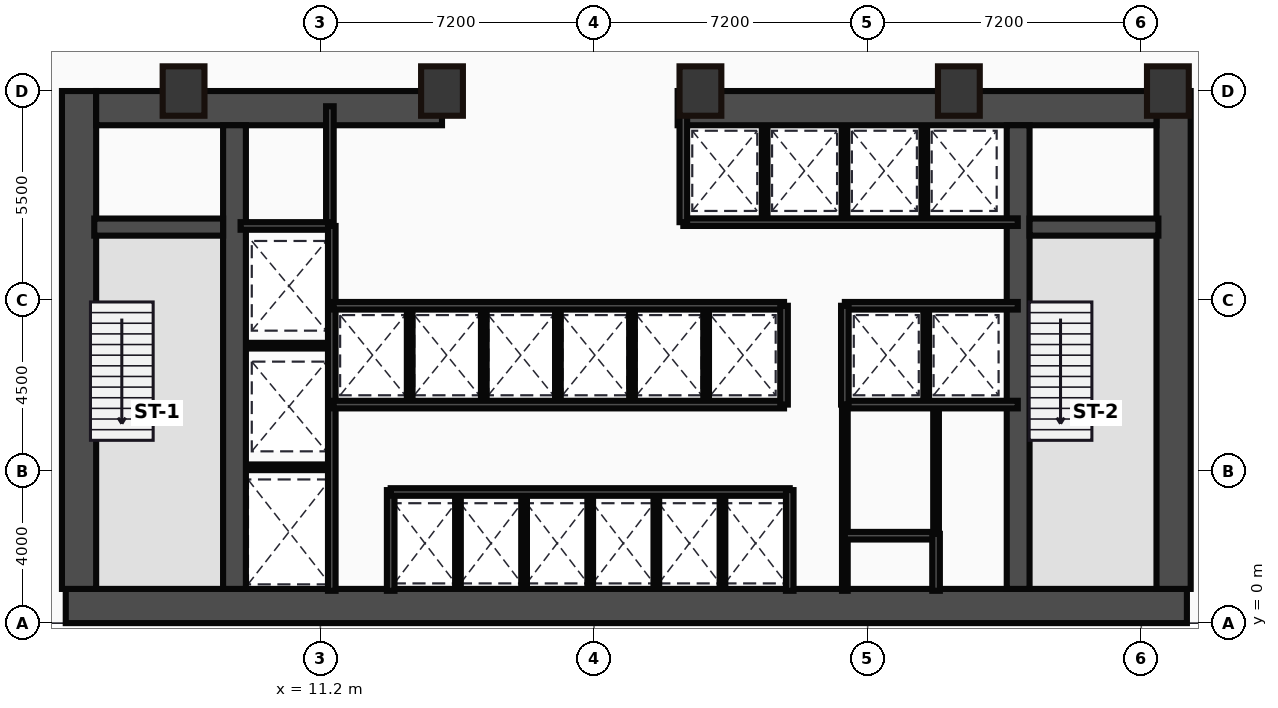
"""IFC4 building model, lengths in metres.
Left out: names, types, materials, properties, quantities, classifications, styles, units other than length and angle.
Written with IfcOpenShell. Run it as: python <this file> out.ifc"""

import sys

from ifc_helpers import new_model, si_unit, direction, frame, frame_2d, origin, origin_2d, place, context, subcontext, project, spatial, rectangle, hollow_rectangle, extrude, source, transform, mapped, element, fill, save


model = new_model("IFC4")
c1 = context("Model", 3, precision=1e-05, world=origin(), true_north=direction((0.0, 1.0)))
c2 = subcontext(c1, "Body", "Model", "MODEL_VIEW")
j1 = project(units=[si_unit("LENGTHUNIT", "METRE"), si_unit("PLANEANGLEUNIT", "RADIAN")], contexts=[c1])
p1 = place(None, origin())
s1 = spatial("IfcSite", under=j1, at=p1, CompositionType="ELEMENT")
p2 = place(p1, origin())
s2 = spatial("IfcBuilding", under=s1, at=p2, CompositionType="ELEMENT")
p3 = place(p2, frame((0.0, 0.0, 6.0)))
s3 = spatial("IfcBuildingStorey", under=s2, at=p3, CompositionType="ELEMENT", Elevation=6.0)
m1 = source(origin(), c2, "Body", "SweptSolid", [
    extrude(rectangle(XDim=29.5, YDim=0.9, at=frame_2d((14.75, 0.0))), origin(), (0.0, 0.0, 1.0), 5.0),
])
p4 = place(p3, frame((4.5, 0.45, 0.0), z_axis=(0.0, 0.0, 1.0), x_axis=(1.0, 0.0, 0.0)))
e1 = element("IfcWall", 1, at=p4, inside=s3, PredefinedType="SHEAR", context=c2, shape_type="MappedRepresentation", body=[
    mapped(m1, transform((0.0, 0.0, 0.0))),
])
m2 = source(origin(), c2, "Body", "SweptSolid", [
    extrude(rectangle(XDim=13.1, YDim=0.9, at=frame_2d((6.55, 0.0))), origin(), (0.0, 0.0, 1.0), 5.0),
])
for number, where, z_axis, x_axis in (
    (2, (4.85, 0.9, 0.0), (0.0, 0.0, 1.0), (0.0, 1.0, 0.0)),
    (3, (33.65, 0.9, 0.0), (0.0, 0.0, 1.0), (0.0, 1.0, 0.0)),
):
    element("IfcWall", number, at=place(p3, frame(where, z_axis=z_axis, x_axis=x_axis)), inside=s3, PredefinedType="SHEAR", context=c2, shape_type="MappedRepresentation", body=[
        mapped(m2, transform((0.0, 0.0, 0.0))),
    ])
m3 = source(origin(), c2, "Body", "SweptSolid", [
    extrude(rectangle(XDim=9.1, YDim=0.9, at=frame_2d((4.55, 0.0))), origin(), (0.0, 0.0, 1.0), 5.0),
])
p5 = place(p3, frame((5.3, 13.55, 0.0), z_axis=(0.0, 0.0, 1.0), x_axis=(1.0, 0.0, 0.0)))
e4 = element("IfcWall", 4, at=p5, inside=s3, PredefinedType="SHEAR", context=c2, shape_type="MappedRepresentation", body=[
    mapped(m3, transform((0.0, 0.0, 0.0))),
])
p6 = place(p5, frame((4.1, 0.0, 0.0)))
e5 = element("IfcOpeningElement", 5, at=p6, cuts=e4, PredefinedType="OPENING", context=c2, shape_type="SweptSolid", body=[
    extrude(rectangle(XDim=1.1, YDim=2.15, at=frame_2d((0.55, 1.075))), frame((0.0, 0.46, 0.0), z_axis=(0.0, -1.0, 0.0), x_axis=(1.0, 0.0, 0.0)), (0.0, 0.0, 1.0), 0.92),
])
m4 = source(origin(), c2, "Body", "SweptSolid", [
    extrude(rectangle(XDim=12.6, YDim=0.9, at=frame_2d((6.3, 0.0))), origin(), (0.0, 0.0, 1.0), 5.0),
])
p7 = place(p3, frame((20.6, 13.55, 0.0), z_axis=(0.0, 0.0, 1.0), x_axis=(1.0, 0.0, 0.0)))
e6 = element("IfcWall", 6, at=p7, inside=s3, PredefinedType="SHEAR", context=c2, shape_type="MappedRepresentation", body=[
    mapped(m4, transform((0.0, 0.0, 0.0))),
])
p8 = place(p7, frame((9.25, 0.0, 0.0)))
e7 = element("IfcOpeningElement", 7, at=p8, cuts=e6, PredefinedType="OPENING", context=c2, shape_type="SweptSolid", body=[
    extrude(rectangle(XDim=1.1, YDim=2.15, at=frame_2d((0.55, 1.075))), frame((0.0, 0.46, 0.0), z_axis=(0.0, -1.0, 0.0), x_axis=(1.0, 0.0, 0.0)), (0.0, 0.0, 1.0), 0.92),
])
m5 = source(origin(), c2, "Body", "SweptSolid", [
    extrude(rectangle(XDim=12.2, YDim=0.6, at=frame_2d((6.1, 0.0))), origin(), (0.0, 0.0, 1.0), 5.0),
])
for number, where, z_axis, x_axis in (
    (8, (8.94, 0.9, 0.0), (0.0, 0.0, 1.0), (0.0, 1.0, 0.0)),
    (9, (29.56, 0.9, 0.0), (0.0, 0.0, 1.0), (0.0, 1.0, 0.0)),
):
    element("IfcWall", number, at=place(p3, frame(where, z_axis=z_axis, x_axis=x_axis)), inside=s3, PredefinedType="SHEAR", context=c2, shape_type="MappedRepresentation", body=[
        mapped(m5, transform((0.0, 0.0, 0.0))),
    ])
m6 = source(origin(), c2, "Body", "SweptSolid", [
    extrude(rectangle(XDim=3.39, YDim=0.45, at=frame_2d((1.695, 0.0))), origin(), (0.0, 0.0, 1.0), 5.0),
])
p9 = place(p3, frame((5.25, 10.42, 0.0), z_axis=(0.0, 0.0, 1.0), x_axis=(1.0, 0.0, 0.0)))
e10 = element("IfcWall", 10, at=p9, inside=s3, PredefinedType="SHEAR", context=c2, shape_type="MappedRepresentation", body=[
    mapped(m6, transform((0.0, 0.0, 0.0))),
])
p10 = place(p9, frame((1.05, 0.0, 0.0)))
e11 = element("IfcOpeningElement", 11, at=p10, cuts=e10, PredefinedType="OPENING", context=c2, shape_type="SweptSolid", body=[
    extrude(rectangle(XDim=1.1, YDim=2.15, at=frame_2d((0.55, 1.075))), frame((0.0, 0.235, 0.0), z_axis=(0.0, -1.0, 0.0), x_axis=(1.0, 0.0, 0.0)), (0.0, 0.0, 1.0), 0.47),
])
p11 = place(p3, frame((29.86, 10.42, 0.0), z_axis=(0.0, 0.0, 1.0), x_axis=(1.0, 0.0, 0.0)))
e12 = element("IfcWall", 12, at=p11, inside=s3, PredefinedType="SHEAR", context=c2, shape_type="MappedRepresentation", body=[
    mapped(m6, transform((0.0, 0.0, 0.0))),
])
p12 = place(p11, frame((1.1, 0.0, 0.0)))
e13 = element("IfcOpeningElement", 13, at=p12, cuts=e12, PredefinedType="OPENING", context=c2, shape_type="SweptSolid", body=[
    extrude(rectangle(XDim=1.1, YDim=2.15, at=frame_2d((0.55, 1.075))), frame((0.0, 0.235, 0.0), z_axis=(0.0, -1.0, 0.0), x_axis=(1.0, 0.0, 0.0)), (0.0, 0.0, 1.0), 0.47),
])
m7 = source(origin(), c2, "Body", "SweptSolid", [
    extrude(hollow_rectangle(XDim=1.1, YDim=1.3, WallThickness=0.055, at=origin_2d()), origin(), (0.0, 0.0, 1.0), 5.0),
])
for number, where, z_axis, x_axis in (
    (14, (7.6, 14.0, 0.0), (0.0, 0.0, 1.0), (1.0, 0.0, 0.0)),
    (15, (14.4, 14.0, 0.0), (0.0, 0.0, 1.0), (1.0, 0.0, 0.0)),
    (16, (21.2, 14.0, 0.0), (0.0, 0.0, 1.0), (1.0, 0.0, 0.0)),
    (17, (28.0, 14.0, 0.0), (0.0, 0.0, 1.0), (1.0, 0.0, 0.0)),
    (18, (33.5, 14.0, 0.0), (0.0, 0.0, 1.0), (1.0, 0.0, 0.0)),
):
    element("IfcColumn", number, at=place(p3, frame(where, z_axis=z_axis, x_axis=x_axis)), inside=s3, PredefinedType="PILASTER", context=c2, shape_type="MappedRepresentation", body=[
        mapped(m7, transform((0.0, 0.0, 0.0))),
    ])
m8 = source(origin(), c2, "Body", "SweptSolid", [
    extrude(rectangle(XDim=3.18, YDim=0.2, at=frame_2d((1.59, 0.0))), origin(), (0.0, 0.0, 1.0), 4.7),
])
p13 = place(p3, frame((11.45, 10.42, 0.0), z_axis=(0.0, 0.0, 1.0), x_axis=(0.0, 1.0, 0.0)))
e19 = element("IfcWall", 19, at=p13, inside=s3, PredefinedType="PARTITIONING", context=c2, shape_type="MappedRepresentation", body=[
    mapped(m8, transform((0.0, 0.0, 0.0))),
])
m9 = source(origin(), c2, "Body", "SweptSolid", [
    extrude(rectangle(XDim=2.35, YDim=0.2, at=frame_2d((1.175, 0.0))), origin(), (0.0, 0.0, 1.0), 4.7),
])
p14 = place(p3, frame((9.1, 10.45, 0.0), z_axis=(0.0, 0.0, 1.0), x_axis=(1.0, 0.0, 0.0)))
e20 = element("IfcWall", 20, at=p14, inside=s3, PredefinedType="PARTITIONING", context=c2, shape_type="MappedRepresentation", body=[
    mapped(m9, transform((0.0, 0.0, 0.0))),
])
p15 = place(p14, frame((0.55, 0.0, 0.0)))
e21 = element("IfcOpeningElement", 21, at=p15, cuts=e20, PredefinedType="OPENING", context=c2, shape_type="SweptSolid", body=[
    extrude(rectangle(XDim=1.1, YDim=2.15, at=frame_2d((0.55, 1.075))), frame((0.0, 0.11, 0.0), z_axis=(0.0, -1.0, 0.0), x_axis=(1.0, 0.0, 0.0)), (0.0, 0.0, 1.0), 0.22),
])
m10 = source(origin(), c2, "Body", "SweptSolid", [
    extrude(rectangle(XDim=9.6, YDim=0.2, at=frame_2d((4.8, 0.0))), origin(), (0.0, 0.0, 1.0), 4.7),
])
p16 = place(p3, frame((11.5, 0.85, 0.0), z_axis=(0.0, 0.0, 1.0), x_axis=(0.0, 1.0, 0.0)))
e22 = element("IfcWall", 22, at=p16, inside=s3, PredefinedType="PARTITIONING", context=c2, shape_type="MappedRepresentation", body=[
    mapped(m10, transform((0.0, 0.0, 0.0))),
])
p17 = place(p16, frame((4.2, 0.0, 0.0)))
e23 = element("IfcOpeningElement", 23, at=p17, cuts=e22, PredefinedType="OPENING", context=c2, shape_type="SweptSolid", body=[
    extrude(rectangle(XDim=1.1, YDim=2.15, at=frame_2d((0.55, 1.075))), frame((0.0, 0.11, 0.0), z_axis=(0.0, -1.0, 0.0), x_axis=(1.0, 0.0, 0.0)), (0.0, 0.0, 1.0), 0.22),
])
p18 = place(p16, frame((0.9, 0.0, 0.0)))
e24 = element("IfcOpeningElement", 24, at=p18, cuts=e22, PredefinedType="OPENING", context=c2, shape_type="SweptSolid", body=[
    extrude(rectangle(XDim=1.2, YDim=2.15, at=frame_2d((0.6, 1.075))), frame((0.0, 0.11, 0.0), z_axis=(0.0, -1.0, 0.0), x_axis=(1.0, 0.0, 0.0)), (0.0, 0.0, 1.0), 0.22),
])
m11 = source(origin(), c2, "Body", "SweptSolid", [
    extrude(rectangle(XDim=2.4, YDim=0.15, at=frame_2d((1.2, 0.0))), origin(), (0.0, 0.0, 1.0), 4.7),
])
for number, where, z_axis, x_axis in (
    (25, (9.1, 4.1, 0.0), (0.0, 0.0, 1.0), (1.0, 0.0, 0.0)),
    (26, (9.1, 7.3, 0.0), (0.0, 0.0, 1.0), (1.0, 0.0, 0.0)),
):
    element("IfcWall", number, at=place(p3, frame(where, z_axis=z_axis, x_axis=x_axis)), inside=s3, PredefinedType="PARTITIONING", context=c2, shape_type="MappedRepresentation", body=[
        mapped(m11, transform((0.0, 0.0, 0.0))),
    ])
m12 = source(origin(), c2, "Body", "SweptSolid", [
    extrude(rectangle(XDim=2.65, YDim=0.2, at=frame_2d((1.325, 0.0))), origin(), (0.0, 0.0, 1.0), 4.7),
])
p19 = place(p3, frame((13.05, 0.85, 0.0), z_axis=(0.0, 0.0, 1.0), x_axis=(0.0, 1.0, 0.0)))
e27 = element("IfcWall", 27, at=p19, inside=s3, PredefinedType="PARTITIONING", context=c2, shape_type="MappedRepresentation", body=[
    mapped(m12, transform((0.0, 0.0, 0.0))),
])
m13 = source(origin(), c2, "Body", "SweptSolid", [
    extrude(rectangle(XDim=10.5, YDim=0.2, at=frame_2d((5.25, 0.0))), origin(), (0.0, 0.0, 1.0), 4.7),
])
p20 = place(p3, frame((13.05, 3.45, 0.0), z_axis=(0.0, 0.0, 1.0), x_axis=(1.0, 0.0, 0.0)))
e28 = element("IfcWall", 28, at=p20, inside=s3, PredefinedType="PARTITIONING", context=c2, shape_type="MappedRepresentation", body=[
    mapped(m13, transform((0.0, 0.0, 0.0))),
])
p21 = place(p3, frame((23.55, 0.85, 0.0), z_axis=(0.0, 0.0, 1.0), x_axis=(0.0, 1.0, 0.0)))
e29 = element("IfcWall", 29, at=p21, inside=s3, PredefinedType="PARTITIONING", context=c2, shape_type="MappedRepresentation", body=[
    mapped(m12, transform((0.0, 0.0, 0.0))),
])
m14 = source(origin(), c2, "Body", "SweptSolid", [
    extrude(rectangle(XDim=2.6, YDim=0.15, at=frame_2d((1.3, 0.0))), origin(), (0.0, 0.0, 1.0), 4.7),
])
for number, where, z_axis, x_axis in (
    (30, (14.82, 0.85, 0.0), (0.0, 0.0, 1.0), (0.0, 1.0, 0.0)),
    (31, (16.56, 0.85, 0.0), (0.0, 0.0, 1.0), (0.0, 1.0, 0.0)),
    (32, (18.3, 0.85, 0.0), (0.0, 0.0, 1.0), (0.0, 1.0, 0.0)),
    (33, (20.04, 0.85, 0.0), (0.0, 0.0, 1.0), (0.0, 1.0, 0.0)),
    (34, (21.78, 0.85, 0.0), (0.0, 0.0, 1.0), (0.0, 1.0, 0.0)),
):
    element("IfcWall", number, at=place(p3, frame(where, z_axis=z_axis, x_axis=x_axis)), inside=s3, PredefinedType="PARTITIONING", context=c2, shape_type="MappedRepresentation", body=[
        mapped(m14, transform((0.0, 0.0, 0.0))),
    ])
m15 = source(origin(), c2, "Body", "SweptSolid", [
    extrude(rectangle(XDim=11.85, YDim=0.2, at=frame_2d((5.925, 0.0))), origin(), (0.0, 0.0, 1.0), 4.7),
])
for number, where, z_axis, x_axis in (
    (35, (11.55, 5.75, 0.0), (0.0, 0.0, 1.0), (1.0, 0.0, 0.0)),
    (36, (11.55, 8.35, 0.0), (0.0, 0.0, 1.0), (1.0, 0.0, 0.0)),
):
    element("IfcWall", number, at=place(p3, frame(where, z_axis=z_axis, x_axis=x_axis)), inside=s3, PredefinedType="PARTITIONING", context=c2, shape_type="MappedRepresentation", body=[
        mapped(m15, transform((0.0, 0.0, 0.0))),
    ])
m16 = source(origin(), c2, "Body", "SweptSolid", [
    extrude(rectangle(XDim=2.6, YDim=0.2, at=frame_2d((1.3, 0.0))), origin(), (0.0, 0.0, 1.0), 4.7),
])
p22 = place(p3, frame((23.4, 5.75, 0.0), z_axis=(0.0, 0.0, 1.0), x_axis=(0.0, 1.0, 0.0)))
e37 = element("IfcWall", 37, at=p22, inside=s3, PredefinedType="PARTITIONING", context=c2, shape_type="MappedRepresentation", body=[
    mapped(m16, transform((0.0, 0.0, 0.0))),
])
m17 = source(origin(), c2, "Body", "SweptSolid", [
    extrude(rectangle(XDim=2.5, YDim=0.15, at=frame_2d((1.25, 0.0))), origin(), (0.0, 0.0, 1.0), 4.7),
])
for number, where, z_axis, x_axis in (
    (38, (13.55, 5.8, 0.0), (0.0, 0.0, 1.0), (0.0, 1.0, 0.0)),
    (39, (15.5, 5.8, 0.0), (0.0, 0.0, 1.0), (0.0, 1.0, 0.0)),
    (40, (17.45, 5.8, 0.0), (0.0, 0.0, 1.0), (0.0, 1.0, 0.0)),
    (41, (19.4, 5.8, 0.0), (0.0, 0.0, 1.0), (0.0, 1.0, 0.0)),
    (42, (21.35, 5.8, 0.0), (0.0, 0.0, 1.0), (0.0, 1.0, 0.0)),
):
    element("IfcWall", number, at=place(p3, frame(where, z_axis=z_axis, x_axis=x_axis)), inside=s3, PredefinedType="PARTITIONING", context=c2, shape_type="MappedRepresentation", body=[
        mapped(m17, transform((0.0, 0.0, 0.0))),
    ])
m18 = source(origin(), c2, "Body", "SweptSolid", [
    extrude(rectangle(XDim=8.8, YDim=0.2, at=frame_2d((4.4, 0.0))), origin(), (0.0, 0.0, 1.0), 4.7),
])
p23 = place(p3, frame((20.75, 10.55, 0.0), z_axis=(0.0, 0.0, 1.0), x_axis=(1.0, 0.0, 0.0)))
e43 = element("IfcWall", 43, at=p23, inside=s3, PredefinedType="PARTITIONING", context=c2, shape_type="MappedRepresentation", body=[
    mapped(m18, transform((0.0, 0.0, 0.0))),
])
m19 = source(origin(), c2, "Body", "SweptSolid", [
    extrude(rectangle(XDim=3.0, YDim=0.2, at=frame_2d((1.5, 0.0))), origin(), (0.0, 0.0, 1.0), 4.7),
])
p24 = place(p3, frame((20.75, 10.55, 0.0), z_axis=(0.0, 0.0, 1.0), x_axis=(0.0, 1.0, 0.0)))
e44 = element("IfcWall", 44, at=p24, inside=s3, PredefinedType="PARTITIONING", context=c2, shape_type="MappedRepresentation", body=[
    mapped(m19, transform((0.0, 0.0, 0.0))),
])
m20 = source(origin(), c2, "Body", "SweptSolid", [
    extrude(rectangle(XDim=2.85, YDim=0.15, at=frame_2d((1.425, 0.0))), origin(), (0.0, 0.0, 1.0), 4.7),
])
for number, where, z_axis, x_axis in (
    (45, (22.89, 10.6, 0.0), (0.0, 0.0, 1.0), (0.0, 1.0, 0.0)),
    (46, (24.99, 10.6, 0.0), (0.0, 0.0, 1.0), (0.0, 1.0, 0.0)),
    (47, (27.09, 10.6, 0.0), (0.0, 0.0, 1.0), (0.0, 1.0, 0.0)),
):
    element("IfcWall", number, at=place(p3, frame(where, z_axis=z_axis, x_axis=x_axis)), inside=s3, PredefinedType="PARTITIONING", context=c2, shape_type="MappedRepresentation", body=[
        mapped(m20, transform((0.0, 0.0, 0.0))),
    ])
m21 = source(origin(), c2, "Body", "SweptSolid", [
    extrude(rectangle(XDim=4.55, YDim=0.2, at=frame_2d((2.275, 0.0))), origin(), (0.0, 0.0, 1.0), 4.7),
])
for number, where, z_axis, x_axis in (
    (48, (25.0, 8.35, 0.0), (0.0, 0.0, 1.0), (1.0, 0.0, 0.0)),
    (49, (25.0, 5.75, 0.0), (0.0, 0.0, 1.0), (1.0, 0.0, 0.0)),
):
    element("IfcWall", number, at=place(p3, frame(where, z_axis=z_axis, x_axis=x_axis)), inside=s3, PredefinedType="PARTITIONING", context=c2, shape_type="MappedRepresentation", body=[
        mapped(m21, transform((0.0, 0.0, 0.0))),
    ])
p25 = place(p3, frame((25.0, 5.75, 0.0), z_axis=(0.0, 0.0, 1.0), x_axis=(0.0, 1.0, 0.0)))
e50 = element("IfcWall", 50, at=p25, inside=s3, PredefinedType="PARTITIONING", context=c2, shape_type="MappedRepresentation", body=[
    mapped(m16, transform((0.0, 0.0, 0.0))),
])
p26 = place(p3, frame((27.14, 5.8, 0.0), z_axis=(0.0, 0.0, 1.0), x_axis=(0.0, 1.0, 0.0)))
e51 = element("IfcWall", 51, at=p26, inside=s3, PredefinedType="PARTITIONING", context=c2, shape_type="MappedRepresentation", body=[
    mapped(m17, transform((0.0, 0.0, 0.0))),
])
m22 = source(origin(), c2, "Body", "SweptSolid", [
    extrude(rectangle(XDim=4.9, YDim=0.15, at=frame_2d((2.45, 0.0))), origin(), (0.0, 0.0, 1.0), 4.7),
])
p27 = place(p3, frame((25.0, 0.85, 0.0), z_axis=(0.0, 0.0, 1.0), x_axis=(0.0, 1.0, 0.0)))
e52 = element("IfcWall", 52, at=p27, inside=s3, PredefinedType="PARTITIONING", context=c2, shape_type="MappedRepresentation", body=[
    mapped(m22, transform((0.0, 0.0, 0.0))),
])
p28 = place(p27, frame((2.5, 0.0, 0.0)))
e53 = element("IfcOpeningElement", 53, at=p28, cuts=e52, PredefinedType="OPENING", context=c2, shape_type="SweptSolid", body=[
    extrude(rectangle(XDim=0.95, YDim=2.15, at=frame_2d((0.475, 1.075))), frame((0.0, 0.085, 0.0), z_axis=(0.0, -1.0, 0.0), x_axis=(1.0, 0.0, 0.0)), (0.0, 0.0, 1.0), 0.17),
])
m23 = source(origin(), c2, "Body", "SweptSolid", [
    extrude(rectangle(XDim=2.4, YDim=0.2, at=frame_2d((1.2, 0.0))), origin(), (0.0, 0.0, 1.0), 4.7),
])
p29 = place(p3, frame((25.0, 2.3, 0.0), z_axis=(0.0, 0.0, 1.0), x_axis=(1.0, 0.0, 0.0)))
e54 = element("IfcWall", 54, at=p29, inside=s3, PredefinedType="PARTITIONING", context=c2, shape_type="MappedRepresentation", body=[
    mapped(m23, transform((0.0, 0.0, 0.0))),
])
m24 = source(origin(), c2, "Body", "SweptSolid", [
    extrude(rectangle(XDim=1.5, YDim=0.2, at=frame_2d((0.75, 0.0))), origin(), (0.0, 0.0, 1.0), 4.7),
])
p30 = place(p3, frame((27.4, 0.85, 0.0), z_axis=(0.0, 0.0, 1.0), x_axis=(0.0, 1.0, 0.0)))
e55 = element("IfcWall", 55, at=p30, inside=s3, PredefinedType="PARTITIONING", context=c2, shape_type="MappedRepresentation", body=[
    mapped(m24, transform((0.0, 0.0, 0.0))),
])
m25 = source(origin(), c2, "Body", "SweptSolid", [
    extrude(rectangle(XDim=3.4, YDim=0.15, at=frame_2d((1.7, 0.0))), origin(), (0.0, 0.0, 1.0), 4.7),
])
p31 = place(p3, frame((27.4, 2.35, 0.0), z_axis=(0.0, 0.0, 1.0), x_axis=(0.0, 1.0, 0.0)))
e56 = element("IfcWall", 56, at=p31, inside=s3, PredefinedType="PARTITIONING", context=c2, shape_type="MappedRepresentation", body=[
    mapped(m25, transform((0.0, 0.0, 0.0))),
])
p32 = place(p31, frame((1.1, 0.0, 0.0)))
e57 = element("IfcOpeningElement", 57, at=p32, cuts=e56, PredefinedType="OPENING", context=c2, shape_type="SweptSolid", body=[
    extrude(rectangle(XDim=0.85, YDim=2.1, at=frame_2d((0.425, 1.05))), frame((0.0, 0.085, 0.0), z_axis=(0.0, -1.0, 0.0), x_axis=(1.0, 0.0, 0.0)), (0.0, 0.0, 1.0), 0.17),
])
m26 = source(origin(), c2, "Body", "SweptSolid", [
    extrude(rectangle(XDim=1.1, YDim=2.15, at=frame_2d((0.55, 1.075))), frame((0.0, 0.025, 0.0), z_axis=(0.0, -1.0, 0.0), x_axis=(1.0, 0.0, 0.0)), (0.0, 0.0, 1.0), 0.05),
])
p33 = place(p10, frame((1.1, 0.0, 0.0), z_axis=(0.0, 0.0, 1.0), x_axis=(-1.0, 0.0, 0.0)))
e58 = element("IfcDoor", 58, at=p33, inside=s3, OperationType="SINGLE_SWING_LEFT", PredefinedType="DOOR", context=c2, shape_type="MappedRepresentation", body=[
    mapped(m26, transform((0.0, 0.0, 0.0))),
])
fill(e11, e58)
p34 = place(p12, frame((1.1, 0.0, 0.0), z_axis=(0.0, 0.0, 1.0), x_axis=(-1.0, 0.0, 0.0)))
e59 = element("IfcDoor", 59, at=p34, inside=s3, OperationType="SINGLE_SWING_RIGHT", PredefinedType="DOOR", context=c2, shape_type="MappedRepresentation", body=[
    mapped(m26, transform((0.0, 0.0, 0.0))),
])
fill(e13, e59)
p35 = place(p6, origin())
e60 = element("IfcDoor", 60, at=p35, inside=s3, OperationType="SINGLE_SWING_RIGHT", PredefinedType="DOOR", context=c2, shape_type="MappedRepresentation", body=[
    mapped(m26, transform((0.0, 0.0, 0.0))),
])
fill(e5, e60)
p36 = place(p8, origin())
e61 = element("IfcDoor", 61, at=p36, inside=s3, OperationType="SINGLE_SWING_LEFT", PredefinedType="DOOR", context=c2, shape_type="MappedRepresentation", body=[
    mapped(m26, transform((0.0, 0.0, 0.0))),
])
fill(e7, e61)
p37 = place(p15, origin())
e62 = element("IfcDoor", 62, at=p37, inside=s3, OperationType="SLIDING_TO_LEFT", PredefinedType="DOOR", context=c2, shape_type="MappedRepresentation", body=[
    mapped(m26, transform((0.0, 0.0, 0.0))),
])
fill(e21, e62)
p38 = place(p17, frame((1.1, 0.0, 0.0), z_axis=(0.0, 0.0, 1.0), x_axis=(-1.0, 0.0, 0.0)))
e63 = element("IfcDoor", 63, at=p38, inside=s3, OperationType="SLIDING_TO_LEFT", PredefinedType="DOOR", context=c2, shape_type="MappedRepresentation", body=[
    mapped(m26, transform((0.0, 0.0, 0.0))),
])
fill(e23, e63)
m27 = source(origin(), c2, "Body", "SweptSolid", [
    extrude(rectangle(XDim=1.2, YDim=2.15, at=frame_2d((0.6, 1.075))), frame((0.0, 0.025, 0.0), z_axis=(0.0, -1.0, 0.0), x_axis=(1.0, 0.0, 0.0)), (0.0, 0.0, 1.0), 0.05),
])
p39 = place(p18, frame((1.2, 0.0, 0.0), z_axis=(0.0, 0.0, 1.0), x_axis=(-1.0, 0.0, 0.0)))
e64 = element("IfcDoor", 64, at=p39, inside=s3, OperationType="SLIDING_TO_LEFT", PredefinedType="DOOR", context=c2, shape_type="MappedRepresentation", body=[
    mapped(m27, transform((0.0, 0.0, 0.0))),
])
fill(e24, e64)
m28 = source(origin(), c2, "Body", "SweptSolid", [
    extrude(rectangle(XDim=0.95, YDim=2.15, at=frame_2d((0.475, 1.075))), frame((0.0, 0.025, 0.0), z_axis=(0.0, -1.0, 0.0), x_axis=(1.0, 0.0, 0.0)), (0.0, 0.0, 1.0), 0.05),
])
p40 = place(p28, origin())
e65 = element("IfcDoor", 65, at=p40, inside=s3, OperationType="SINGLE_SWING_RIGHT", PredefinedType="DOOR", context=c2, shape_type="MappedRepresentation", body=[
    mapped(m28, transform((0.0, 0.0, 0.0))),
])
fill(e53, e65)
m29 = source(origin(), c2, "Body", "SweptSolid", [
    extrude(rectangle(XDim=0.85, YDim=2.1, at=frame_2d((0.425, 1.05))), frame((0.0, 0.025, 0.0), z_axis=(0.0, -1.0, 0.0), x_axis=(1.0, 0.0, 0.0)), (0.0, 0.0, 1.0), 0.05),
])
p41 = place(p32, frame((0.85, 0.0, 0.0), z_axis=(0.0, 0.0, 1.0), x_axis=(-1.0, 0.0, 0.0)))
e66 = element("IfcDoor", 66, at=p41, inside=s3, OperationType="SINGLE_SWING_LEFT", PredefinedType="DOOR", context=c2, shape_type="MappedRepresentation", body=[
    mapped(m29, transform((0.0, 0.0, 0.0))),
])
fill(e57, e66)
save(model, sys.argv[1])
